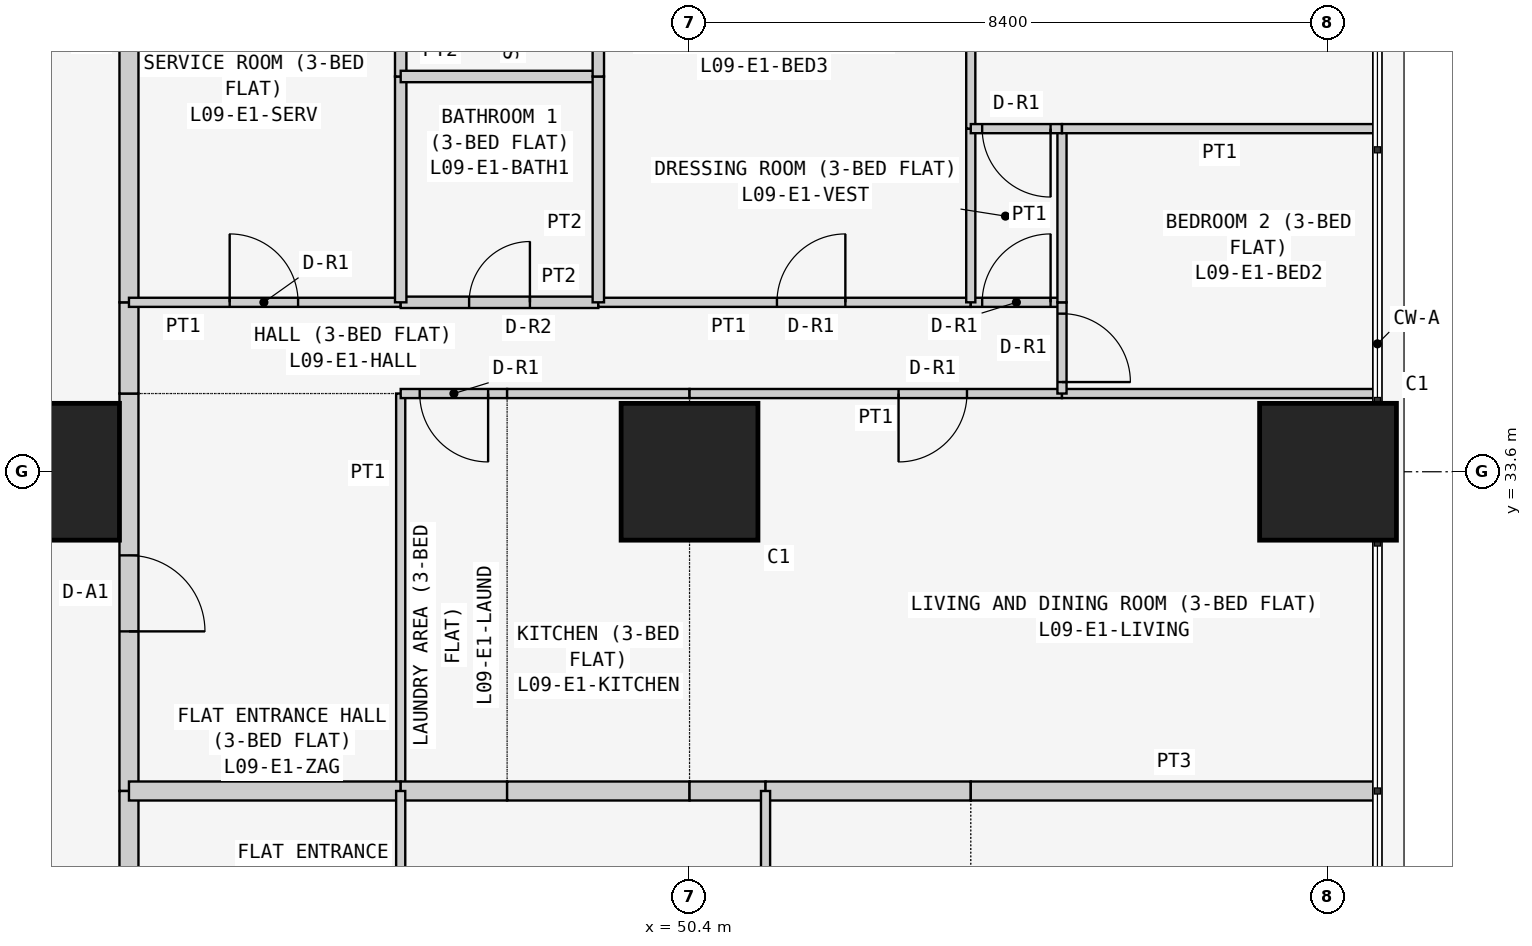
"""IFC4 building model, lengths in metres.
Left out: names, types, materials, properties, quantities, classifications, styles, units other than length and angle.
Written with IfcOpenShell. Run it as: python <this file> out.ifc"""

import sys

from ifc_helpers import new_model, si_unit, direction, frame, frame_2d, origin, origin_2d, place, context, subcontext, project, spatial, rectangle, extrude, element, fill, save


model = new_model("IFC4")
c1 = context("Model", 3, precision=1e-05, world=origin(), true_north=direction((0.0, 1.0)))
c2 = subcontext(c1, "Body", "Model", "MODEL_VIEW")
j1 = project(units=[si_unit("LENGTHUNIT", "METRE"), si_unit("PLANEANGLEUNIT", "RADIAN")], contexts=[c1])
p1 = place(None, origin())
s1 = spatial("IfcSite", under=j1, at=p1, CompositionType="ELEMENT")
p2 = place(p1, origin())
s2 = spatial("IfcBuilding", under=s1, at=p2, CompositionType="ELEMENT")
p3 = place(p2, frame((0.0, 0.0, 41.7)))
s3 = spatial("IfcBuildingStorey", under=s2, at=p3, CompositionType="ELEMENT", Elevation=41.7)
for number, where, z_axis, x_axis in (
    (1, (42.0, 33.6, 0.0), (0.0, 0.0, 1.0), (1.0, 0.0, 0.0)),
    (2, (50.4, 33.6, 0.0), (0.0, 0.0, 1.0), (1.0, 0.0, 0.0)),
    (3, (58.8, 33.6, 0.0), (0.0, 0.0, 1.0), (1.0, 0.0, 0.0)),
):
    element("IfcColumn", number, at=place(p3, frame(where, z_axis=z_axis, x_axis=x_axis)), inside=s3, PredefinedType="COLUMN", context=c2, shape_type="SweptSolid", body=[
        extrude(rectangle(XDim=1.8, YDim=1.8, at=origin_2d()), origin(), (0.0, 0.0, 1.0), 3.6),
    ])
p4 = place(p3, frame((43.025, 34.629, 0.0), z_axis=(0.0, 0.0, 1.0), x_axis=(0.0, -1.0, 0.0)))
e4 = element("IfcWall", 4, at=p4, inside=s3, PredefinedType="PARTITIONING", context=c2, shape_type="SweptSolid", body=[
    extrude(rectangle(XDim=5.229, YDim=0.25, at=frame_2d((2.615, 0.0))), origin(), (0.0, 0.0, 1.0), 3.45),
])
p5 = place(p4, frame((2.129, 0.0, 0.0)))
e5 = element("IfcOpeningElement", 5, at=p5, cuts=e4, PredefinedType="OPENING", context=c2, shape_type="SweptSolid", body=[
    extrude(rectangle(XDim=1.0, YDim=2.1, at=frame_2d((0.5, 1.05))), frame((0.0, 0.135, 0.0), z_axis=(0.0, -1.0, 0.0), x_axis=(1.0, 0.0, 0.0)), (0.0, 0.0, 1.0), 0.27),
])
p6 = place(p3, frame((43.025, 35.829, 0.0), z_axis=(0.0, 0.0, 1.0), x_axis=(0.0, -1.0, 0.0)))
e6 = element("IfcWall", 6, at=p6, inside=s3, PredefinedType="PARTITIONING", context=c2, shape_type="SweptSolid", body=[
    extrude(rectangle(XDim=1.2, YDim=0.25, at=frame_2d((0.6, 0.0))), origin(), (0.0, 0.0, 1.0), 3.45),
])
p7 = place(p3, frame((43.025, 42.7, 0.0), z_axis=(0.0, 0.0, 1.0), x_axis=(0.0, -1.0, 0.0)))
e7 = element("IfcWall", 7, at=p7, inside=s3, PredefinedType="PARTITIONING", context=c2, shape_type="SweptSolid", body=[
    extrude(rectangle(XDim=6.871, YDim=0.25, at=frame_2d((3.436, 0.0))), origin(), (0.0, 0.0, 1.0), 3.45),
])
p8 = place(p3, frame((43.025, 29.4, 0.0), z_axis=(0.0, 0.0, 1.0), x_axis=(0.0, -1.0, 0.0)))
e8 = element("IfcWall", 8, at=p8, inside=s3, PredefinedType="PARTITIONING", context=c2, shape_type="SweptSolid", body=[
    extrude(rectangle(XDim=5.229, YDim=0.25, at=frame_2d((2.615, 0.0))), origin(), (0.0, 0.0, 1.0), 3.45),
])
p9 = place(p8, frame((2.1, 0.0, 0.0)))
e9 = element("IfcOpeningElement", 9, at=p9, cuts=e8, PredefinedType="OPENING", context=c2, shape_type="SweptSolid", body=[
    extrude(rectangle(XDim=1.0, YDim=2.1, at=frame_2d((0.5, 1.05))), frame((0.0, 0.135, 0.0), z_axis=(0.0, -1.0, 0.0), x_axis=(1.0, 0.0, 0.0)), (0.0, 0.0, 1.0), 0.27),
])
p10 = place(p3, frame((46.6, 29.4, 0.0), z_axis=(0.0, 0.0, 1.0), x_axis=(0.0, 1.0, 0.0)))
e10 = element("IfcWall", 10, at=p10, inside=s3, PredefinedType="PARTITIONING", context=c2, shape_type="SweptSolid", body=[
    extrude(rectangle(XDim=5.229, YDim=0.12, at=frame_2d((2.615, 0.0))), origin(), (0.0, 0.0, 1.0), 3.45),
])
p11 = place(p3, frame((43.025, 29.4, 0.0), z_axis=(0.0, 0.0, 1.0), x_axis=(1.0, 0.0, 0.0)))
e11 = element("IfcWall", 11, at=p11, inside=s3, PredefinedType="PARTITIONING", context=c2, shape_type="SweptSolid", body=[
    extrude(rectangle(XDim=3.575, YDim=0.25, at=frame_2d((1.788, 0.0))), origin(), (0.0, 0.0, 1.0), 3.45),
])
p12 = place(p3, frame((48.0, 34.629, 0.0), z_axis=(0.0, 0.0, 1.0), x_axis=(-1.0, 0.0, 0.0)))
e12 = element("IfcWall", 12, at=p12, inside=s3, PredefinedType="PARTITIONING", context=c2, shape_type="SweptSolid", body=[
    extrude(rectangle(XDim=1.4, YDim=0.12, at=frame_2d((0.7, 0.0))), origin(), (0.0, 0.0, 1.0), 3.45),
])
p13 = place(p12, frame((0.25, 0.0, 0.0)))
e13 = element("IfcOpeningElement", 13, at=p13, cuts=e12, PredefinedType="OPENING", context=c2, shape_type="SweptSolid", body=[
    extrude(rectangle(XDim=0.9, YDim=2.1, at=frame_2d((0.45, 1.05))), frame((0.0, 0.07, 0.0), z_axis=(0.0, -1.0, 0.0), x_axis=(1.0, 0.0, 0.0)), (0.0, 0.0, 1.0), 0.14),
])
p14 = place(p3, frame((46.6, 29.4, 0.0), z_axis=(0.0, 0.0, 1.0), x_axis=(1.0, 0.0, 0.0)))
e14 = element("IfcWall", 14, at=p14, inside=s3, PredefinedType="PARTITIONING", context=c2, shape_type="SweptSolid", body=[
    extrude(rectangle(XDim=1.4, YDim=0.25, at=frame_2d((0.7, 0.0))), origin(), (0.0, 0.0, 1.0), 3.45),
])
p15 = place(p3, frame((50.4, 34.629, 0.0), z_axis=(0.0, 0.0, 1.0), x_axis=(-1.0, 0.0, 0.0)))
e15 = element("IfcWall", 15, at=p15, inside=s3, PredefinedType="PARTITIONING", context=c2, shape_type="SweptSolid", body=[
    extrude(rectangle(XDim=2.4, YDim=0.12, at=frame_2d((1.2, 0.0))), origin(), (0.0, 0.0, 1.0), 3.45),
])
p16 = place(p3, frame((48.0, 29.4, 0.0), z_axis=(0.0, 0.0, 1.0), x_axis=(1.0, 0.0, 0.0)))
e16 = element("IfcWall", 16, at=p16, inside=s3, PredefinedType="PARTITIONING", context=c2, shape_type="SweptSolid", body=[
    extrude(rectangle(XDim=2.4, YDim=0.25, at=frame_2d((1.2, 0.0))), origin(), (0.0, 0.0, 1.0), 3.45),
])
p17 = place(p3, frame((55.3, 34.629, 0.0), z_axis=(0.0, 0.0, 1.0), x_axis=(-1.0, 0.0, 0.0)))
e17 = element("IfcWall", 17, at=p17, inside=s3, PredefinedType="PARTITIONING", context=c2, shape_type="SweptSolid", body=[
    extrude(rectangle(XDim=4.9, YDim=0.12, at=frame_2d((2.45, 0.0))), origin(), (0.0, 0.0, 1.0), 3.45),
])
p18 = place(p17, frame((1.25, 0.0, 0.0)))
e18 = element("IfcOpeningElement", 18, at=p18, cuts=e17, PredefinedType="OPENING", context=c2, shape_type="SweptSolid", body=[
    extrude(rectangle(XDim=0.9, YDim=2.1, at=frame_2d((0.45, 1.05))), frame((0.0, 0.07, 0.0), z_axis=(0.0, -1.0, 0.0), x_axis=(1.0, 0.0, 0.0)), (0.0, 0.0, 1.0), 0.14),
])
p19 = place(p3, frame((59.45, 34.629, 0.0), z_axis=(0.0, 0.0, 1.0), x_axis=(-1.0, 0.0, 0.0)))
e19 = element("IfcWall", 19, at=p19, inside=s3, PredefinedType="PARTITIONING", context=c2, shape_type="SweptSolid", body=[
    extrude(rectangle(XDim=4.15, YDim=0.12, at=frame_2d((2.075, 0.0))), origin(), (0.0, 0.0, 1.0), 3.45),
])
p20 = place(p3, frame((50.4, 29.4, 0.0), z_axis=(0.0, 0.0, 1.0), x_axis=(1.0, 0.0, 0.0)))
e20 = element("IfcWall", 20, at=p20, inside=s3, PredefinedType="PARTITIONING", context=c2, shape_type="SweptSolid", body=[
    extrude(rectangle(XDim=1.0, YDim=0.25, at=frame_2d((0.5, 0.0))), origin(), (0.0, 0.0, 1.0), 3.45),
])
p21 = place(p3, frame((51.4, 29.4, 0.0), z_axis=(0.0, 0.0, 1.0), x_axis=(1.0, 0.0, 0.0)))
e21 = element("IfcWall", 21, at=p21, inside=s3, PredefinedType="PARTITIONING", context=c2, shape_type="SweptSolid", body=[
    extrude(rectangle(XDim=2.7, YDim=0.25, at=frame_2d((1.35, 0.0))), origin(), (0.0, 0.0, 1.0), 3.45),
])
p22 = place(p3, frame((54.1, 29.4, 0.0), z_axis=(0.0, 0.0, 1.0), x_axis=(1.0, 0.0, 0.0)))
e22 = element("IfcWall", 22, at=p22, inside=s3, PredefinedType="PARTITIONING", context=c2, shape_type="SweptSolid", body=[
    extrude(rectangle(XDim=5.35, YDim=0.25, at=frame_2d((2.675, 0.0))), origin(), (0.0, 0.0, 1.0), 3.45),
])
p23 = place(p3, frame((46.6, 35.829, 0.0), z_axis=(0.0, 0.0, 1.0), x_axis=(-1.0, 0.0, 0.0)))
e23 = element("IfcWall", 23, at=p23, inside=s3, PredefinedType="PARTITIONING", context=c2, shape_type="SweptSolid", body=[
    extrude(rectangle(XDim=3.575, YDim=0.12, at=frame_2d((1.788, 0.0))), origin(), (0.0, 0.0, 1.0), 3.45),
])
p24 = place(p23, frame((1.35, 0.0, 0.0)))
e24 = element("IfcOpeningElement", 24, at=p24, cuts=e23, PredefinedType="OPENING", context=c2, shape_type="SweptSolid", body=[
    extrude(rectangle(XDim=0.9, YDim=2.1, at=frame_2d((0.45, 1.05))), frame((0.0, 0.07, 0.0), z_axis=(0.0, -1.0, 0.0), x_axis=(1.0, 0.0, 0.0)), (0.0, 0.0, 1.0), 0.14),
])
p25 = place(p3, frame((49.2, 35.829, 0.0), z_axis=(0.0, 0.0, 1.0), x_axis=(-1.0, 0.0, 0.0)))
e25 = element("IfcWall", 25, at=p25, inside=s3, PredefinedType="PARTITIONING", context=c2, shape_type="SweptSolid", body=[
    extrude(rectangle(XDim=2.6, YDim=0.15, at=frame_2d((1.3, 0.0))), origin(), (0.0, 0.0, 1.0), 3.45),
])
p26 = place(p25, frame((0.9, 0.0, 0.0)))
e26 = element("IfcOpeningElement", 26, at=p26, cuts=e25, PredefinedType="OPENING", context=c2, shape_type="SweptSolid", body=[
    extrude(rectangle(XDim=0.8, YDim=2.1, at=frame_2d((0.4, 1.05))), frame((0.0, 0.085, 0.0), z_axis=(0.0, -1.0, 0.0), x_axis=(1.0, 0.0, 0.0)), (0.0, 0.0, 1.0), 0.17),
])
p27 = place(p3, frame((54.1, 35.829, 0.0), z_axis=(0.0, 0.0, 1.0), x_axis=(-1.0, 0.0, 0.0)))
e27 = element("IfcWall", 27, at=p27, inside=s3, PredefinedType="PARTITIONING", context=c2, shape_type="SweptSolid", body=[
    extrude(rectangle(XDim=4.9, YDim=0.12, at=frame_2d((2.45, 0.0))), origin(), (0.0, 0.0, 1.0), 3.45),
])
p28 = place(p27, frame((1.65, 0.0, 0.0)))
e28 = element("IfcOpeningElement", 28, at=p28, cuts=e27, PredefinedType="OPENING", context=c2, shape_type="SweptSolid", body=[
    extrude(rectangle(XDim=0.9, YDim=2.1, at=frame_2d((0.45, 1.05))), frame((0.0, 0.07, 0.0), z_axis=(0.0, -1.0, 0.0), x_axis=(1.0, 0.0, 0.0)), (0.0, 0.0, 1.0), 0.14),
])
p29 = place(p3, frame((55.3, 35.829, 0.0), z_axis=(0.0, 0.0, 1.0), x_axis=(-1.0, 0.0, 0.0)))
e29 = element("IfcWall", 29, at=p29, inside=s3, PredefinedType="PARTITIONING", context=c2, shape_type="SweptSolid", body=[
    extrude(rectangle(XDim=1.2, YDim=0.12, at=frame_2d((0.6, 0.0))), origin(), (0.0, 0.0, 1.0), 3.45),
])
p30 = place(p29, frame((0.15, 0.0, 0.0)))
e30 = element("IfcOpeningElement", 30, at=p30, cuts=e29, PredefinedType="OPENING", context=c2, shape_type="SweptSolid", body=[
    extrude(rectangle(XDim=0.9, YDim=2.1, at=frame_2d((0.45, 1.05))), frame((0.0, 0.07, 0.0), z_axis=(0.0, -1.0, 0.0), x_axis=(1.0, 0.0, 0.0)), (0.0, 0.0, 1.0), 0.14),
])
p31 = place(p3, frame((55.3, 34.629, 0.0), z_axis=(0.0, 0.0, 1.0), x_axis=(0.0, 1.0, 0.0)))
e31 = element("IfcWall", 31, at=p31, inside=s3, PredefinedType="PARTITIONING", context=c2, shape_type="SweptSolid", body=[
    extrude(rectangle(XDim=1.2, YDim=0.12, at=frame_2d((0.6, 0.0))), origin(), (0.0, 0.0, 1.0), 3.45),
])
p32 = place(p31, frame((0.151, 0.0, 0.0)))
e32 = element("IfcOpeningElement", 32, at=p32, cuts=e31, PredefinedType="OPENING", context=c2, shape_type="SweptSolid", body=[
    extrude(rectangle(XDim=0.9, YDim=2.1, at=frame_2d((0.45, 1.05))), frame((0.0, 0.07, 0.0), z_axis=(0.0, -1.0, 0.0), x_axis=(1.0, 0.0, 0.0)), (0.0, 0.0, 1.0), 0.14),
])
p33 = place(p3, frame((46.6, 35.829, 0.0), z_axis=(0.0, 0.0, 1.0), x_axis=(0.0, 1.0, 0.0)))
e33 = element("IfcWall", 33, at=p33, inside=s3, PredefinedType="PARTITIONING", context=c2, shape_type="SweptSolid", body=[
    extrude(rectangle(XDim=2.971, YDim=0.15, at=frame_2d((1.485, 0.0))), origin(), (0.0, 0.0, 1.0), 3.45),
])
p34 = place(p3, frame((46.6, 38.8, 0.0), z_axis=(0.0, 0.0, 1.0), x_axis=(0.0, 1.0, 0.0)))
e34 = element("IfcWall", 34, at=p34, inside=s3, PredefinedType="PARTITIONING", context=c2, shape_type="SweptSolid", body=[
    extrude(rectangle(XDim=3.9, YDim=0.15, at=frame_2d((1.95, 0.0))), origin(), (0.0, 0.0, 1.0), 3.45),
])
p35 = place(p34, frame((1.45, 0.0, 0.0)))
e35 = element("IfcOpeningElement", 35, at=p35, cuts=e34, PredefinedType="OPENING", context=c2, shape_type="SweptSolid", body=[
    extrude(rectangle(XDim=0.8, YDim=2.1, at=frame_2d((0.4, 1.05))), frame((0.0, 0.085, 0.0), z_axis=(0.0, -1.0, 0.0), x_axis=(1.0, 0.0, 0.0)), (0.0, 0.0, 1.0), 0.17),
])
p36 = place(p3, frame((49.2, 38.8, 0.0), z_axis=(0.0, 0.0, 1.0), x_axis=(-1.0, 0.0, 0.0)))
e36 = element("IfcWall", 36, at=p36, inside=s3, PredefinedType="PARTITIONING", context=c2, shape_type="SweptSolid", body=[
    extrude(rectangle(XDim=2.6, YDim=0.15, at=frame_2d((1.3, 0.0))), origin(), (0.0, 0.0, 1.0), 3.45),
])
p37 = place(p3, frame((49.2, 35.829, 0.0), z_axis=(0.0, 0.0, 1.0), x_axis=(0.0, 1.0, 0.0)))
e37 = element("IfcWall", 37, at=p37, inside=s3, PredefinedType="PARTITIONING", context=c2, shape_type="SweptSolid", body=[
    extrude(rectangle(XDim=2.971, YDim=0.15, at=frame_2d((1.485, 0.0))), origin(), (0.0, 0.0, 1.0), 3.45),
])
p38 = place(p3, frame((49.2, 38.8, 0.0), z_axis=(0.0, 0.0, 1.0), x_axis=(0.0, 1.0, 0.0)))
e38 = element("IfcWall", 38, at=p38, inside=s3, PredefinedType="PARTITIONING", context=c2, shape_type="SweptSolid", body=[
    extrude(rectangle(XDim=3.9, YDim=0.15, at=frame_2d((1.95, 0.0))), origin(), (0.0, 0.0, 1.0), 3.45),
])
p39 = place(p3, frame((54.1, 35.829, 0.0), z_axis=(0.0, 0.0, 1.0), x_axis=(0.0, 1.0, 0.0)))
e39 = element("IfcWall", 39, at=p39, inside=s3, PredefinedType="PARTITIONING", context=c2, shape_type="SweptSolid", body=[
    extrude(rectangle(XDim=2.285, YDim=0.12, at=frame_2d((1.143, 0.0))), origin(), (0.0, 0.0, 1.0), 3.45),
])
p40 = place(p3, frame((54.1, 38.114, 0.0), z_axis=(0.0, 0.0, 1.0), x_axis=(0.0, 1.0, 0.0)))
e40 = element("IfcWall", 40, at=p40, inside=s3, PredefinedType="PARTITIONING", context=c2, shape_type="SweptSolid", body=[
    extrude(rectangle(XDim=4.586, YDim=0.12, at=frame_2d((2.293, 0.0))), origin(), (0.0, 0.0, 1.0), 3.45),
])
p41 = place(p3, frame((55.3, 35.829, 0.0), z_axis=(0.0, 0.0, 1.0), x_axis=(0.0, 1.0, 0.0)))
e41 = element("IfcWall", 41, at=p41, inside=s3, PredefinedType="PARTITIONING", context=c2, shape_type="SweptSolid", body=[
    extrude(rectangle(XDim=2.285, YDim=0.12, at=frame_2d((1.143, 0.0))), origin(), (0.0, 0.0, 1.0), 3.45),
])
p42 = place(p3, frame((55.3, 38.114, 0.0), z_axis=(0.0, 0.0, 1.0), x_axis=(-1.0, 0.0, 0.0)))
e42 = element("IfcWall", 42, at=p42, inside=s3, PredefinedType="PARTITIONING", context=c2, shape_type="SweptSolid", body=[
    extrude(rectangle(XDim=1.2, YDim=0.12, at=frame_2d((0.6, 0.0))), origin(), (0.0, 0.0, 1.0), 3.45),
])
p43 = place(p42, frame((0.15, 0.0, 0.0)))
e43 = element("IfcOpeningElement", 43, at=p43, cuts=e42, PredefinedType="OPENING", context=c2, shape_type="SweptSolid", body=[
    extrude(rectangle(XDim=0.9, YDim=2.1, at=frame_2d((0.45, 1.05))), frame((0.0, 0.07, 0.0), z_axis=(0.0, -1.0, 0.0), x_axis=(1.0, 0.0, 0.0)), (0.0, 0.0, 1.0), 0.14),
])
p44 = place(p3, frame((59.45, 38.114, 0.0), z_axis=(0.0, 0.0, 1.0), x_axis=(-1.0, 0.0, 0.0)))
e44 = element("IfcWall", 44, at=p44, inside=s3, PredefinedType="PARTITIONING", context=c2, shape_type="SweptSolid", body=[
    extrude(rectangle(XDim=4.15, YDim=0.12, at=frame_2d((2.075, 0.0))), origin(), (0.0, 0.0, 1.0), 3.45),
])
for number, where, z_axis, x_axis in (
    (45, (46.6, 29.4, 0.0), (0.0, 0.0, 1.0), (0.0, -1.0, 0.0)),
    (46, (51.4, 29.4, 0.0), (0.0, 0.0, 1.0), (0.0, -1.0, 0.0)),
):
    element("IfcWall", number, at=place(p3, frame(where, z_axis=z_axis, x_axis=x_axis)), inside=s3, PredefinedType="PARTITIONING", context=c2, shape_type="SweptSolid", body=[
        extrude(rectangle(XDim=5.229, YDim=0.12, at=frame_2d((2.615, 0.0))), origin(), (0.0, 0.0, 1.0), 3.45),
    ])
p45 = place(p5, origin())
e47 = element("IfcDoor", 47, at=p45, inside=s3, OperationType="SINGLE_SWING_RIGHT", PredefinedType="DOOR", context=c2, shape_type="SweptSolid", body=[
    extrude(rectangle(XDim=1.0, YDim=2.1, at=frame_2d((0.5, 1.05))), frame((0.0, 0.025, 0.0), z_axis=(0.0, -1.0, 0.0), x_axis=(1.0, 0.0, 0.0)), (0.0, 0.0, 1.0), 0.05),
])
fill(e5, e47)
p46 = place(p13, origin())
e48 = element("IfcDoor", 48, at=p46, inside=s3, OperationType="SINGLE_SWING_LEFT", PredefinedType="DOOR", context=c2, shape_type="SweptSolid", body=[
    extrude(rectangle(XDim=0.9, YDim=2.1, at=frame_2d((0.45, 1.05))), frame((0.0, 0.025, 0.0), z_axis=(0.0, -1.0, 0.0), x_axis=(1.0, 0.0, 0.0)), (0.0, 0.0, 1.0), 0.05),
])
fill(e13, e48)
p47 = place(p18, origin())
e49 = element("IfcDoor", 49, at=p47, inside=s3, OperationType="SINGLE_SWING_RIGHT", PredefinedType="DOOR", context=c2, shape_type="SweptSolid", body=[
    extrude(rectangle(XDim=0.9, YDim=2.1, at=frame_2d((0.45, 1.05))), frame((0.0, 0.025, 0.0), z_axis=(0.0, -1.0, 0.0), x_axis=(1.0, 0.0, 0.0)), (0.0, 0.0, 1.0), 0.05),
])
fill(e18, e49)
p48 = place(p24, frame((0.9, 0.0, 0.0), z_axis=(0.0, 0.0, 1.0), x_axis=(-1.0, 0.0, 0.0)))
e50 = element("IfcDoor", 50, at=p48, inside=s3, OperationType="SINGLE_SWING_LEFT", PredefinedType="DOOR", context=c2, shape_type="SweptSolid", body=[
    extrude(rectangle(XDim=0.9, YDim=2.1, at=frame_2d((0.45, 1.05))), frame((0.0, 0.025, 0.0), z_axis=(0.0, -1.0, 0.0), x_axis=(1.0, 0.0, 0.0)), (0.0, 0.0, 1.0), 0.05),
])
fill(e24, e50)
p49 = place(p26, frame((0.8, 0.0, 0.0), z_axis=(0.0, 0.0, 1.0), x_axis=(-1.0, 0.0, 0.0)))
e51 = element("IfcDoor", 51, at=p49, inside=s3, OperationType="SINGLE_SWING_RIGHT", PredefinedType="DOOR", context=c2, shape_type="SweptSolid", body=[
    extrude(rectangle(XDim=0.8, YDim=2.1, at=frame_2d((0.4, 1.05))), frame((0.0, 0.025, 0.0), z_axis=(0.0, -1.0, 0.0), x_axis=(1.0, 0.0, 0.0)), (0.0, 0.0, 1.0), 0.05),
])
fill(e26, e51)
p50 = place(p28, frame((0.9, 0.0, 0.0), z_axis=(0.0, 0.0, 1.0), x_axis=(-1.0, 0.0, 0.0)))
e52 = element("IfcDoor", 52, at=p50, inside=s3, OperationType="SINGLE_SWING_RIGHT", PredefinedType="DOOR", context=c2, shape_type="SweptSolid", body=[
    extrude(rectangle(XDim=0.9, YDim=2.1, at=frame_2d((0.45, 1.05))), frame((0.0, 0.025, 0.0), z_axis=(0.0, -1.0, 0.0), x_axis=(1.0, 0.0, 0.0)), (0.0, 0.0, 1.0), 0.05),
])
fill(e28, e52)
p51 = place(p30, frame((0.9, 0.0, 0.0), z_axis=(0.0, 0.0, 1.0), x_axis=(-1.0, 0.0, 0.0)))
e53 = element("IfcDoor", 53, at=p51, inside=s3, OperationType="SINGLE_SWING_RIGHT", PredefinedType="DOOR", context=c2, shape_type="SweptSolid", body=[
    extrude(rectangle(XDim=0.9, YDim=2.1, at=frame_2d((0.45, 1.05))), frame((0.0, 0.025, 0.0), z_axis=(0.0, -1.0, 0.0), x_axis=(1.0, 0.0, 0.0)), (0.0, 0.0, 1.0), 0.05),
])
fill(e30, e53)
p52 = place(p43, origin())
e54 = element("IfcDoor", 54, at=p52, inside=s3, OperationType="SINGLE_SWING_LEFT", PredefinedType="DOOR", context=c2, shape_type="SweptSolid", body=[
    extrude(rectangle(XDim=0.9, YDim=2.1, at=frame_2d((0.45, 1.05))), frame((0.0, 0.025, 0.0), z_axis=(0.0, -1.0, 0.0), x_axis=(1.0, 0.0, 0.0)), (0.0, 0.0, 1.0), 0.05),
])
fill(e43, e54)
p53 = place(p32, frame((0.9, 0.0, 0.0), z_axis=(0.0, 0.0, 1.0), x_axis=(-1.0, 0.0, 0.0)))
e55 = element("IfcDoor", 55, at=p53, inside=s3, OperationType="SINGLE_SWING_RIGHT", PredefinedType="DOOR", context=c2, shape_type="SweptSolid", body=[
    extrude(rectangle(XDim=0.9, YDim=2.1, at=frame_2d((0.45, 1.05))), frame((0.0, 0.025, 0.0), z_axis=(0.0, -1.0, 0.0), x_axis=(1.0, 0.0, 0.0)), (0.0, 0.0, 1.0), 0.05),
])
fill(e32, e55)
save(model, sys.argv[1])
